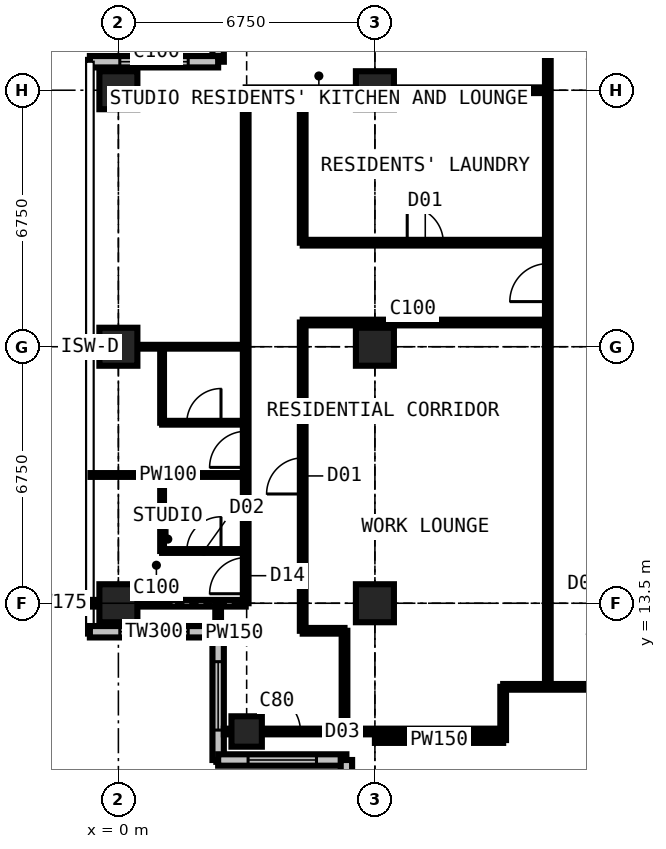
"""IFC4 building model, lengths in metres.
Left out: names, types, materials, properties, quantities, classifications, styles, units other than length and angle.
Written with IfcOpenShell. Run it as: python <this file> out.ifc"""

import sys

from ifc_helpers import new_model, si_unit, direction, frame, frame_2d, origin, origin_2d, place, context, subcontext, project, spatial, rectangle, extrude, element, fill, save


model = new_model("IFC4")
c1 = context("Model", 3, precision=1e-05, world=origin(), true_north=direction((0.0, 1.0)))
c2 = subcontext(c1, "Body", "Model", "MODEL_VIEW")
j1 = project(units=[si_unit("LENGTHUNIT", "METRE"), si_unit("PLANEANGLEUNIT", "RADIAN")], contexts=[c1])
p1 = place(None, origin())
s1 = spatial("IfcSite", under=j1, at=p1, CompositionType="ELEMENT")
p2 = place(p1, origin())
s2 = spatial("IfcBuilding", under=s1, at=p2, CompositionType="ELEMENT")
p3 = place(p2, frame((0.0, 0.0, 243.9)))
s3 = spatial("IfcBuildingStorey", under=s2, at=p3, CompositionType="ELEMENT", Elevation=243.9)
for number, where, z_axis, x_axis in (
    (1, (0.0, 13.5, 0.0), (0.0, 0.0, 1.0), (1.0, 0.0, 0.0)),
    (2, (0.0, 20.25, 0.0), (0.0, 0.0, 1.0), (1.0, 0.0, 0.0)),
    (3, (0.0, 27.0, 0.0), (0.0, 0.0, 1.0), (1.0, 0.0, 0.0)),
):
    element("IfcColumn", number, at=place(p3, frame(where, z_axis=z_axis, x_axis=x_axis)), inside=s3, PredefinedType="COLUMN", context=c2, shape_type="SweptSolid", body=[
        extrude(rectangle(XDim=1.0, YDim=1.0, at=origin_2d()), origin(), (0.0, 0.0, 1.0), 3.6),
    ])
p4 = place(p3, frame((3.375, 10.125, 0.0), z_axis=(0.0, 0.0, 1.0), x_axis=(1.0, 0.0, 0.0)))
e4 = element("IfcColumn", 4, at=p4, inside=s3, PredefinedType="COLUMN", context=c2, shape_type="SweptSolid", body=[
    extrude(rectangle(XDim=0.8, YDim=0.8, at=origin_2d()), origin(), (0.0, 0.0, 1.0), 3.6),
])
for number, where, z_axis, x_axis in (
    (5, (6.75, 13.5, 0.0), (0.0, 0.0, 1.0), (1.0, 0.0, 0.0)),
    (6, (6.75, 20.25, 0.0), (0.0, 0.0, 1.0), (1.0, 0.0, 0.0)),
    (7, (6.75, 27.0, 0.0), (0.0, 0.0, 1.0), (1.0, 0.0, 0.0)),
):
    element("IfcColumn", number, at=place(p3, frame(where, z_axis=z_axis, x_axis=x_axis)), inside=s3, PredefinedType="COLUMN", context=c2, shape_type="SweptSolid", body=[
        extrude(rectangle(XDim=1.0, YDim=1.0, at=origin_2d()), origin(), (0.0, 0.0, 1.0), 3.6),
    ])
p5 = place(p3, frame((2.625, 31.125, 0.0), z_axis=(0.0, 0.0, 1.0), x_axis=(0.0, -1.0, 0.0)))
e8 = element("IfcWall", 8, at=p5, inside=s3, PredefinedType="SOLIDWALL", context=c2, shape_type="SweptSolid", body=[
    extrude(rectangle(XDim=3.375, YDim=0.3, at=frame_2d((1.688, 0.0))), origin(), (0.0, 0.0, 1.0), 3.375),
])
p6 = place(p5, frame((0.788, 0.0, 0.6)))
e9 = element("IfcOpeningElement", 9, at=p6, cuts=e8, PredefinedType="OPENING", context=c2, shape_type="SweptSolid", body=[
    extrude(rectangle(XDim=1.8, YDim=2.1, at=frame_2d((0.9, 1.05))), frame((0.0, 0.16, 0.0), z_axis=(0.0, -1.0, 0.0), x_axis=(1.0, 0.0, 0.0)), (0.0, 0.0, 1.0), 0.32),
])
p7 = place(p3, frame((2.625, 27.75, 0.0), z_axis=(0.0, 0.0, 1.0), x_axis=(-1.0, 0.0, 0.0)))
e10 = element("IfcWall", 10, at=p7, inside=s3, PredefinedType="SOLIDWALL", context=c2, shape_type="SweptSolid", body=[
    extrude(rectangle(XDim=3.375, YDim=0.3, at=frame_2d((1.688, 0.0))), origin(), (0.0, 0.0, 1.0), 3.375),
])
p8 = place(p7, frame((0.788, 0.0, 0.6)))
e11 = element("IfcOpeningElement", 11, at=p8, cuts=e10, PredefinedType="OPENING", context=c2, shape_type="SweptSolid", body=[
    extrude(rectangle(XDim=1.8, YDim=2.1, at=frame_2d((0.9, 1.05))), frame((0.0, 0.16, 0.0), z_axis=(0.0, -1.0, 0.0), x_axis=(1.0, 0.0, 0.0)), (0.0, 0.0, 1.0), 0.32),
])
p9 = place(p3, frame((-0.75, 12.75, 0.0), z_axis=(0.0, 0.0, 1.0), x_axis=(1.0, 0.0, 0.0)))
e12 = element("IfcWall", 12, at=p9, inside=s3, PredefinedType="SOLIDWALL", context=c2, shape_type="SweptSolid", body=[
    extrude(rectangle(XDim=3.375, YDim=0.3, at=frame_2d((1.688, 0.0))), origin(), (0.0, 0.0, 1.0), 3.375),
])
p10 = place(p9, frame((0.788, 0.0, 0.6)))
e13 = element("IfcOpeningElement", 13, at=p10, cuts=e12, PredefinedType="OPENING", context=c2, shape_type="SweptSolid", body=[
    extrude(rectangle(XDim=1.8, YDim=2.1, at=frame_2d((0.9, 1.05))), frame((0.0, 0.16, 0.0), z_axis=(0.0, -1.0, 0.0), x_axis=(1.0, 0.0, 0.0)), (0.0, 0.0, 1.0), 0.32),
])
p11 = place(p3, frame((2.625, 12.75, 0.0), z_axis=(0.0, 0.0, 1.0), x_axis=(0.0, -1.0, 0.0)))
e14 = element("IfcWall", 14, at=p11, inside=s3, PredefinedType="SOLIDWALL", context=c2, shape_type="SweptSolid", body=[
    extrude(rectangle(XDim=3.375, YDim=0.3, at=frame_2d((1.688, 0.0))), origin(), (0.0, 0.0, 1.0), 3.375),
])
p12 = place(p11, frame((0.788, 0.0, 0.6)))
e15 = element("IfcOpeningElement", 15, at=p12, cuts=e14, PredefinedType="OPENING", context=c2, shape_type="SweptSolid", body=[
    extrude(rectangle(XDim=1.8, YDim=2.1, at=frame_2d((0.9, 1.05))), frame((0.0, 0.16, 0.0), z_axis=(0.0, -1.0, 0.0), x_axis=(1.0, 0.0, 0.0)), (0.0, 0.0, 1.0), 0.32),
])
p13 = place(p3, frame((2.625, 9.375, 0.0), z_axis=(0.0, 0.0, 1.0), x_axis=(1.0, 0.0, 0.0)))
e16 = element("IfcWall", 16, at=p13, inside=s3, PredefinedType="SOLIDWALL", context=c2, shape_type="SweptSolid", body=[
    extrude(rectangle(XDim=3.375, YDim=0.3, at=frame_2d((1.688, 0.0))), origin(), (0.0, 0.0, 1.0), 3.375),
])
p14 = place(p13, frame((0.788, 0.0, 0.6)))
e17 = element("IfcOpeningElement", 17, at=p14, cuts=e16, PredefinedType="OPENING", context=c2, shape_type="SweptSolid", body=[
    extrude(rectangle(XDim=1.8, YDim=2.1, at=frame_2d((0.9, 1.05))), frame((0.0, 0.16, 0.0), z_axis=(0.0, -1.0, 0.0), x_axis=(1.0, 0.0, 0.0)), (0.0, 0.0, 1.0), 0.32),
])
p15 = place(p3, frame((6.0, 9.375, 0.0), z_axis=(0.0, 0.0, 1.0), x_axis=(0.0, -1.0, 0.0)))
e18 = element("IfcWall", 18, at=p15, inside=s3, PredefinedType="SOLIDWALL", context=c2, shape_type="SweptSolid", body=[
    extrude(rectangle(XDim=3.375, YDim=0.3, at=frame_2d((1.688, 0.0))), origin(), (0.0, 0.0, 1.0), 3.375),
])
p16 = place(p15, frame((0.788, 0.0, 0.6)))
e19 = element("IfcOpeningElement", 19, at=p16, cuts=e18, PredefinedType="OPENING", context=c2, shape_type="SweptSolid", body=[
    extrude(rectangle(XDim=1.8, YDim=2.1, at=frame_2d((0.9, 1.05))), frame((0.0, 0.16, 0.0), z_axis=(0.0, -1.0, 0.0), x_axis=(1.0, 0.0, 0.0)), (0.0, 0.0, 1.0), 0.32),
])
p17 = place(p3, frame((-0.734, 13.5, 0.0), z_axis=(0.0, 0.0, 1.0), x_axis=(1.0, 0.0, 0.0)))
e20 = element("IfcWall", 20, at=p17, inside=s3, PredefinedType="PARTITIONING", context=c2, shape_type="SweptSolid", body=[
    extrude(rectangle(XDim=4.084, YDim=0.175, at=frame_2d((2.042, 0.0))), origin(), (0.0, 0.0, 1.0), 2.877),
])
p18 = place(p3, frame((-0.734, 16.875, 0.0), z_axis=(0.0, 0.0, 1.0), x_axis=(1.0, 0.0, 0.0)))
e21 = element("IfcWall", 21, at=p18, inside=s3, PredefinedType="PARTITIONING", context=c2, shape_type="SweptSolid", body=[
    extrude(rectangle(XDim=4.084, YDim=0.1, at=frame_2d((2.042, 0.0))), origin(), (0.0, 0.0, 1.0), 3.375),
])
p19 = place(p3, frame((-0.734, 20.25, 0.0), z_axis=(0.0, 0.0, 1.0), x_axis=(1.0, 0.0, 0.0)))
e22 = element("IfcWall", 22, at=p19, inside=s3, PredefinedType="PARTITIONING", context=c2, shape_type="SweptSolid", body=[
    extrude(rectangle(XDim=4.084, YDim=0.1, at=frame_2d((2.042, 0.0))), origin(), (0.0, 0.0, 1.0), 2.877),
])
p20 = place(p3, frame((1.15, 14.875, 0.0), z_axis=(0.0, 0.0, 1.0), x_axis=(0.0, 1.0, 0.0)))
e23 = element("IfcWall", 23, at=p20, inside=s3, PredefinedType="PARTITIONING", context=c2, shape_type="SweptSolid", body=[
    extrude(rectangle(XDim=2.0, YDim=0.1, at=frame_2d((1.0, 0.0))), origin(), (0.0, 0.0, 1.0), 3.375),
])
p21 = place(p3, frame((1.15, 14.875, 0.0), z_axis=(0.0, 0.0, 1.0), x_axis=(1.0, 0.0, 0.0)))
e24 = element("IfcWall", 24, at=p21, inside=s3, PredefinedType="PARTITIONING", context=c2, shape_type="SweptSolid", body=[
    extrude(rectangle(XDim=2.2, YDim=0.1, at=frame_2d((1.1, 0.0))), origin(), (0.0, 0.0, 1.0), 3.375),
])
p22 = place(p21, frame((0.65, 0.0, 0.0)))
e25 = element("IfcOpeningElement", 25, at=p22, cuts=e24, PredefinedType="OPENING", context=c2, shape_type="SweptSolid", body=[
    extrude(rectangle(XDim=0.9, YDim=2.2, at=frame_2d((0.45, 1.1))), frame((0.0, 0.06, 0.0), z_axis=(0.0, -1.0, 0.0), x_axis=(1.0, 0.0, 0.0)), (0.0, 0.0, 1.0), 0.12),
])
p23 = place(p3, frame((1.15, 18.25, 0.0), z_axis=(0.0, 0.0, 1.0), x_axis=(0.0, 1.0, 0.0)))
e26 = element("IfcWall", 26, at=p23, inside=s3, PredefinedType="PARTITIONING", context=c2, shape_type="SweptSolid", body=[
    extrude(rectangle(XDim=2.0, YDim=0.1, at=frame_2d((1.0, 0.0))), origin(), (0.0, 0.0, 1.0), 3.375),
])
p24 = place(p3, frame((1.15, 18.25, 0.0), z_axis=(0.0, 0.0, 1.0), x_axis=(1.0, 0.0, 0.0)))
e27 = element("IfcWall", 27, at=p24, inside=s3, PredefinedType="PARTITIONING", context=c2, shape_type="SweptSolid", body=[
    extrude(rectangle(XDim=2.2, YDim=0.1, at=frame_2d((1.1, 0.0))), origin(), (0.0, 0.0, 1.0), 3.375),
])
p25 = place(p24, frame((0.65, 0.0, 0.0)))
e28 = element("IfcOpeningElement", 28, at=p25, cuts=e27, PredefinedType="OPENING", context=c2, shape_type="SweptSolid", body=[
    extrude(rectangle(XDim=0.9, YDim=2.2, at=frame_2d((0.45, 1.1))), frame((0.0, 0.06, 0.0), z_axis=(0.0, -1.0, 0.0), x_axis=(1.0, 0.0, 0.0)), (0.0, 0.0, 1.0), 0.12),
])
p26 = place(p3, frame((2.625, 12.766, 0.0), z_axis=(0.0, 0.0, 1.0), x_axis=(0.0, 1.0, 0.0)))
e29 = element("IfcWall", 29, at=p26, inside=s3, PredefinedType="PARTITIONING", context=c2, shape_type="SweptSolid", body=[
    extrude(rectangle(XDim=0.734, YDim=0.15, at=frame_2d((0.367, 0.0))), origin(), (0.0, 0.0, 1.0), 3.375),
])
p27 = place(p3, frame((2.775, 10.125, 0.0), z_axis=(0.0, 0.0, 1.0), x_axis=(1.0, 0.0, 0.0)))
e30 = element("IfcWall", 30, at=p27, inside=s3, PredefinedType="PARTITIONING", context=c2, shape_type="SweptSolid", body=[
    extrude(rectangle(XDim=7.35, YDim=0.15, at=frame_2d((3.675, 0.0))), origin(), (0.0, 0.0, 1.0), 2.877),
])
p28 = place(p27, frame((1.016, 0.0, 0.0)))
e31 = element("IfcOpeningElement", 31, at=p28, cuts=e30, PredefinedType="OPENING", context=c2, shape_type="SweptSolid", body=[
    extrude(rectangle(XDim=1.0, YDim=2.2, at=frame_2d((0.5, 1.1))), frame((0.0, 0.085, 0.0), z_axis=(0.0, -1.0, 0.0), x_axis=(1.0, 0.0, 0.0)), (0.0, 0.0, 1.0), 0.17),
])
p29 = place(p3, frame((3.35, 13.5, 0.0), z_axis=(0.0, 0.0, 1.0), x_axis=(0.0, 1.0, 0.0)))
e32 = element("IfcWall", 32, at=p29, inside=s3, PredefinedType="PARTITIONING", context=c2, shape_type="SweptSolid", body=[
    extrude(rectangle(XDim=13.5, YDim=0.15, at=frame_2d((6.75, 0.0))), origin(), (0.0, 0.0, 1.0), 3.375),
])
p30 = place(p29, frame((0.25, 0.0, 0.0)))
e33 = element("IfcOpeningElement", 33, at=p30, cuts=e32, PredefinedType="OPENING", context=c2, shape_type="SweptSolid", body=[
    extrude(rectangle(XDim=0.95, YDim=2.2, at=frame_2d((0.475, 1.1))), frame((0.0, 0.085, 0.0), z_axis=(0.0, -1.0, 0.0), x_axis=(1.0, 0.0, 0.0)), (0.0, 0.0, 1.0), 0.17),
])
p31 = place(p29, frame((3.575, 0.0, 0.0)))
e34 = element("IfcOpeningElement", 34, at=p31, cuts=e32, PredefinedType="OPENING", context=c2, shape_type="SweptSolid", body=[
    extrude(rectangle(XDim=0.95, YDim=2.2, at=frame_2d((0.475, 1.1))), frame((0.0, 0.085, 0.0), z_axis=(0.0, -1.0, 0.0), x_axis=(1.0, 0.0, 0.0)), (0.0, 0.0, 1.0), 0.17),
])
p32 = place(p3, frame((3.35, 27.0, 0.0), z_axis=(0.0, 0.0, 1.0), x_axis=(1.0, 0.0, 0.0)))
e35 = element("IfcWall", 35, at=p32, inside=s3, PredefinedType="PARTITIONING", context=c2, shape_type="SweptSolid", body=[
    extrude(rectangle(XDim=7.95, YDim=0.15, at=frame_2d((3.975, 0.0))), origin(), (0.0, 0.0, 1.0), 2.877),
])
p33 = place(p3, frame((4.85, 12.775, 0.0), z_axis=(0.0, 0.0, 1.0), x_axis=(0.0, 1.0, 0.0)))
e36 = element("IfcWall", 36, at=p33, inside=s3, PredefinedType="PARTITIONING", context=c2, shape_type="SweptSolid", body=[
    extrude(rectangle(XDim=8.113, YDim=0.15, at=frame_2d((4.056, 0.0))), origin(), (0.0, 0.0, 1.0), 3.375),
])
p34 = place(p33, frame((3.6, 0.0, 0.0)))
e37 = element("IfcOpeningElement", 37, at=p34, cuts=e36, PredefinedType="OPENING", context=c2, shape_type="SweptSolid", body=[
    extrude(rectangle(XDim=0.95, YDim=2.2, at=frame_2d((0.475, 1.1))), frame((0.0, 0.085, 0.0), z_axis=(0.0, -1.0, 0.0), x_axis=(1.0, 0.0, 0.0)), (0.0, 0.0, 1.0), 0.17),
])
p35 = place(p3, frame((4.85, 12.775, 0.0), z_axis=(0.0, 0.0, 1.0), x_axis=(1.0, 0.0, 0.0)))
e38 = element("IfcWall", 38, at=p35, inside=s3, PredefinedType="PARTITIONING", context=c2, shape_type="SweptSolid", body=[
    extrude(rectangle(XDim=1.1, YDim=0.15, at=frame_2d((0.55, 0.0))), origin(), (0.0, 0.0, 1.0), 3.375),
])
p36 = place(p3, frame((4.85, 20.887, 0.0), z_axis=(0.0, 0.0, 1.0), x_axis=(1.0, 0.0, 0.0)))
e39 = element("IfcWall", 39, at=p36, inside=s3, PredefinedType="PARTITIONING", context=c2, shape_type="SweptSolid", body=[
    extrude(rectangle(XDim=6.45, YDim=0.15, at=frame_2d((3.225, 0.0))), origin(), (0.0, 0.0, 1.0), 3.375),
])
p37 = place(p3, frame((4.85, 22.988, 0.0), z_axis=(0.0, 0.0, 1.0), x_axis=(0.0, 1.0, 0.0)))
e40 = element("IfcWall", 40, at=p37, inside=s3, PredefinedType="PARTITIONING", context=c2, shape_type="SweptSolid", body=[
    extrude(rectangle(XDim=4.012, YDim=0.15, at=frame_2d((2.006, 0.0))), origin(), (0.0, 0.0, 1.0), 3.375),
])
p38 = place(p3, frame((4.85, 22.988, 0.0), z_axis=(0.0, 0.0, 1.0), x_axis=(1.0, 0.0, 0.0)))
e41 = element("IfcWall", 41, at=p38, inside=s3, PredefinedType="PARTITIONING", context=c2, shape_type="SweptSolid", body=[
    extrude(rectangle(XDim=6.45, YDim=0.15, at=frame_2d((3.225, 0.0))), origin(), (0.0, 0.0, 1.0), 3.375),
])
p39 = place(p38, frame((2.75, 0.0, 0.0)))
e42 = element("IfcOpeningElement", 42, at=p39, cuts=e41, PredefinedType="OPENING", context=c2, shape_type="SweptSolid", body=[
    extrude(rectangle(XDim=0.95, YDim=2.2, at=frame_2d((0.475, 1.1))), frame((0.0, 0.085, 0.0), z_axis=(0.0, -1.0, 0.0), x_axis=(1.0, 0.0, 0.0)), (0.0, 0.0, 1.0), 0.17),
])
p40 = place(p3, frame((5.95, 10.125, 0.0), z_axis=(0.0, 0.0, 1.0), x_axis=(0.0, 1.0, 0.0)))
e43 = element("IfcWall", 43, at=p40, inside=s3, PredefinedType="PARTITIONING", context=c2, shape_type="SweptSolid", body=[
    extrude(rectangle(XDim=2.65, YDim=0.15, at=frame_2d((1.325, 0.0))), origin(), (0.0, 0.0, 1.0), 3.375),
])
p41 = place(p3, frame((6.75, 9.9, 0.0), z_axis=(0.0, 0.0, 1.0), x_axis=(1.0, 0.0, 0.0)))
e44 = element("IfcWall", 44, at=p41, inside=s3, PredefinedType="PARTITIONING", context=c2, shape_type="SweptSolid", body=[
    extrude(rectangle(XDim=3.375, YDim=0.15, at=frame_2d((1.688, 0.0))), origin(), (0.0, 0.0, 1.0), 3.375),
])
p42 = place(p3, frame((10.125, 9.9, 0.0), z_axis=(0.0, 0.0, 1.0), x_axis=(0.0, 1.0, 0.0)))
e45 = element("IfcWall", 45, at=p42, inside=s3, PredefinedType="PARTITIONING", context=c2, shape_type="SweptSolid", body=[
    extrude(rectangle(XDim=1.4, YDim=0.15, at=frame_2d((0.7, 0.0))), origin(), (0.0, 0.0, 1.0), 3.375),
])
p43 = place(p3, frame((10.125, 11.3, 0.0), z_axis=(0.0, 0.0, 1.0), x_axis=(1.0, 0.0, 0.0)))
e46 = element("IfcWall", 46, at=p43, inside=s3, PredefinedType="PARTITIONING", context=c2, shape_type="SweptSolid", body=[
    extrude(rectangle(XDim=3.375, YDim=0.15, at=frame_2d((1.688, 0.0))), origin(), (0.0, 0.0, 1.0), 3.375),
])
p44 = place(p3, frame((11.3, 11.3, 0.0), z_axis=(0.0, 0.0, 1.0), x_axis=(0.0, 1.0, 0.0)))
e47 = element("IfcWall", 47, at=p44, inside=s3, PredefinedType="PARTITIONING", context=c2, shape_type="SweptSolid", body=[
    extrude(rectangle(XDim=19.3, YDim=0.15, at=frame_2d((9.65, 0.0))), origin(), (0.0, 0.0, 1.0), 3.375),
])
p45 = place(p44, frame((18.1, 0.0, 0.0)))
e48 = element("IfcOpeningElement", 48, at=p45, cuts=e47, PredefinedType="OPENING", context=c2, shape_type="SweptSolid", body=[
    extrude(rectangle(XDim=1.0, YDim=2.2, at=frame_2d((0.5, 1.1))), frame((0.0, 0.085, 0.0), z_axis=(0.0, -1.0, 0.0), x_axis=(1.0, 0.0, 0.0)), (0.0, 0.0, 1.0), 0.17),
])
p46 = place(p44, frame((10.137, 0.0, 0.0)))
e49 = element("IfcOpeningElement", 49, at=p46, cuts=e47, PredefinedType="OPENING", context=c2, shape_type="SweptSolid", body=[
    extrude(rectangle(XDim=1.0, YDim=2.2, at=frame_2d((0.5, 1.1))), frame((0.0, 0.085, 0.0), z_axis=(0.0, -1.0, 0.0), x_axis=(1.0, 0.0, 0.0)), (0.0, 0.0, 1.0), 0.17),
])
p47 = place(p8, origin())
e50 = element("IfcWindow", 50, at=p47, inside=s3, PartitioningType="SINGLE_PANEL", PredefinedType="WINDOW", context=c2, shape_type="SweptSolid", body=[
    extrude(rectangle(XDim=1.8, YDim=2.1, at=frame_2d((0.9, 1.05))), frame((0.0, 0.03, 0.0), z_axis=(0.0, -1.0, 0.0), x_axis=(1.0, 0.0, 0.0)), (0.0, 0.0, 1.0), 0.06),
])
fill(e11, e50)
p48 = place(p10, origin())
e51 = element("IfcWindow", 51, at=p48, inside=s3, PartitioningType="SINGLE_PANEL", PredefinedType="WINDOW", context=c2, shape_type="SweptSolid", body=[
    extrude(rectangle(XDim=1.8, YDim=2.1, at=frame_2d((0.9, 1.05))), frame((0.0, 0.03, 0.0), z_axis=(0.0, -1.0, 0.0), x_axis=(1.0, 0.0, 0.0)), (0.0, 0.0, 1.0), 0.06),
])
fill(e13, e51)
p49 = place(p12, origin())
e52 = element("IfcWindow", 52, at=p49, inside=s3, PartitioningType="SINGLE_PANEL", PredefinedType="WINDOW", context=c2, shape_type="SweptSolid", body=[
    extrude(rectangle(XDim=1.8, YDim=2.1, at=frame_2d((0.9, 1.05))), frame((0.0, 0.03, 0.0), z_axis=(0.0, -1.0, 0.0), x_axis=(1.0, 0.0, 0.0)), (0.0, 0.0, 1.0), 0.06),
])
fill(e15, e52)
p50 = place(p14, origin())
e53 = element("IfcWindow", 53, at=p50, inside=s3, PartitioningType="SINGLE_PANEL", PredefinedType="WINDOW", context=c2, shape_type="SweptSolid", body=[
    extrude(rectangle(XDim=1.8, YDim=2.1, at=frame_2d((0.9, 1.05))), frame((0.0, 0.03, 0.0), z_axis=(0.0, -1.0, 0.0), x_axis=(1.0, 0.0, 0.0)), (0.0, 0.0, 1.0), 0.06),
])
fill(e17, e53)
p51 = place(p28, origin())
e54 = element("IfcDoor", 54, at=p51, inside=s3, OperationType="SINGLE_SWING_LEFT", PredefinedType="DOOR", context=c2, shape_type="SweptSolid", body=[
    extrude(rectangle(XDim=1.0, YDim=2.2, at=frame_2d((0.5, 1.1))), frame((0.0, 0.025, 0.0), z_axis=(0.0, -1.0, 0.0), x_axis=(1.0, 0.0, 0.0)), (0.0, 0.0, 1.0), 0.05),
])
fill(e31, e54)
p52 = place(p30, origin())
e55 = element("IfcDoor", 55, at=p52, inside=s3, OperationType="SINGLE_SWING_LEFT", PredefinedType="DOOR", context=c2, shape_type="SweptSolid", body=[
    extrude(rectangle(XDim=0.95, YDim=2.2, at=frame_2d((0.475, 1.1))), frame((0.0, 0.025, 0.0), z_axis=(0.0, -1.0, 0.0), x_axis=(1.0, 0.0, 0.0)), (0.0, 0.0, 1.0), 0.05),
])
fill(e33, e55)
p53 = place(p22, origin())
e56 = element("IfcDoor", 56, at=p53, inside=s3, OperationType="SINGLE_SWING_RIGHT", PredefinedType="DOOR", context=c2, shape_type="SweptSolid", body=[
    extrude(rectangle(XDim=0.9, YDim=2.2, at=frame_2d((0.45, 1.1))), frame((0.0, 0.025, 0.0), z_axis=(0.0, -1.0, 0.0), x_axis=(1.0, 0.0, 0.0)), (0.0, 0.0, 1.0), 0.05),
])
fill(e25, e56)
p54 = place(p31, origin())
e57 = element("IfcDoor", 57, at=p54, inside=s3, OperationType="SINGLE_SWING_LEFT", PredefinedType="DOOR", context=c2, shape_type="SweptSolid", body=[
    extrude(rectangle(XDim=0.95, YDim=2.2, at=frame_2d((0.475, 1.1))), frame((0.0, 0.025, 0.0), z_axis=(0.0, -1.0, 0.0), x_axis=(1.0, 0.0, 0.0)), (0.0, 0.0, 1.0), 0.05),
])
fill(e34, e57)
p55 = place(p25, origin())
e58 = element("IfcDoor", 58, at=p55, inside=s3, OperationType="SINGLE_SWING_RIGHT", PredefinedType="DOOR", context=c2, shape_type="SweptSolid", body=[
    extrude(rectangle(XDim=0.9, YDim=2.2, at=frame_2d((0.45, 1.1))), frame((0.0, 0.025, 0.0), z_axis=(0.0, -1.0, 0.0), x_axis=(1.0, 0.0, 0.0)), (0.0, 0.0, 1.0), 0.05),
])
fill(e28, e58)
p56 = place(p46, origin())
e59 = element("IfcDoor", 59, at=p56, inside=s3, OperationType="SINGLE_SWING_LEFT", PredefinedType="DOOR", context=c2, shape_type="SweptSolid", body=[
    extrude(rectangle(XDim=1.0, YDim=2.2, at=frame_2d((0.5, 1.1))), frame((0.0, 0.025, 0.0), z_axis=(0.0, -1.0, 0.0), x_axis=(1.0, 0.0, 0.0)), (0.0, 0.0, 1.0), 0.05),
])
fill(e49, e59)
p57 = place(p39, origin())
e60 = element("IfcDoor", 60, at=p57, inside=s3, OperationType="SINGLE_SWING_LEFT", PredefinedType="DOOR", context=c2, shape_type="SweptSolid", body=[
    extrude(rectangle(XDim=0.95, YDim=2.2, at=frame_2d((0.475, 1.1))), frame((0.0, 0.025, 0.0), z_axis=(0.0, -1.0, 0.0), x_axis=(1.0, 0.0, 0.0)), (0.0, 0.0, 1.0), 0.05),
])
fill(e42, e60)
p58 = place(p34, origin())
e61 = element("IfcDoor", 61, at=p58, inside=s3, OperationType="SINGLE_SWING_LEFT", PredefinedType="DOOR", context=c2, shape_type="SweptSolid", body=[
    extrude(rectangle(XDim=0.95, YDim=2.2, at=frame_2d((0.475, 1.1))), frame((0.0, 0.025, 0.0), z_axis=(0.0, -1.0, 0.0), x_axis=(1.0, 0.0, 0.0)), (0.0, 0.0, 1.0), 0.05),
])
fill(e37, e61)
save(model, sys.argv[1])
